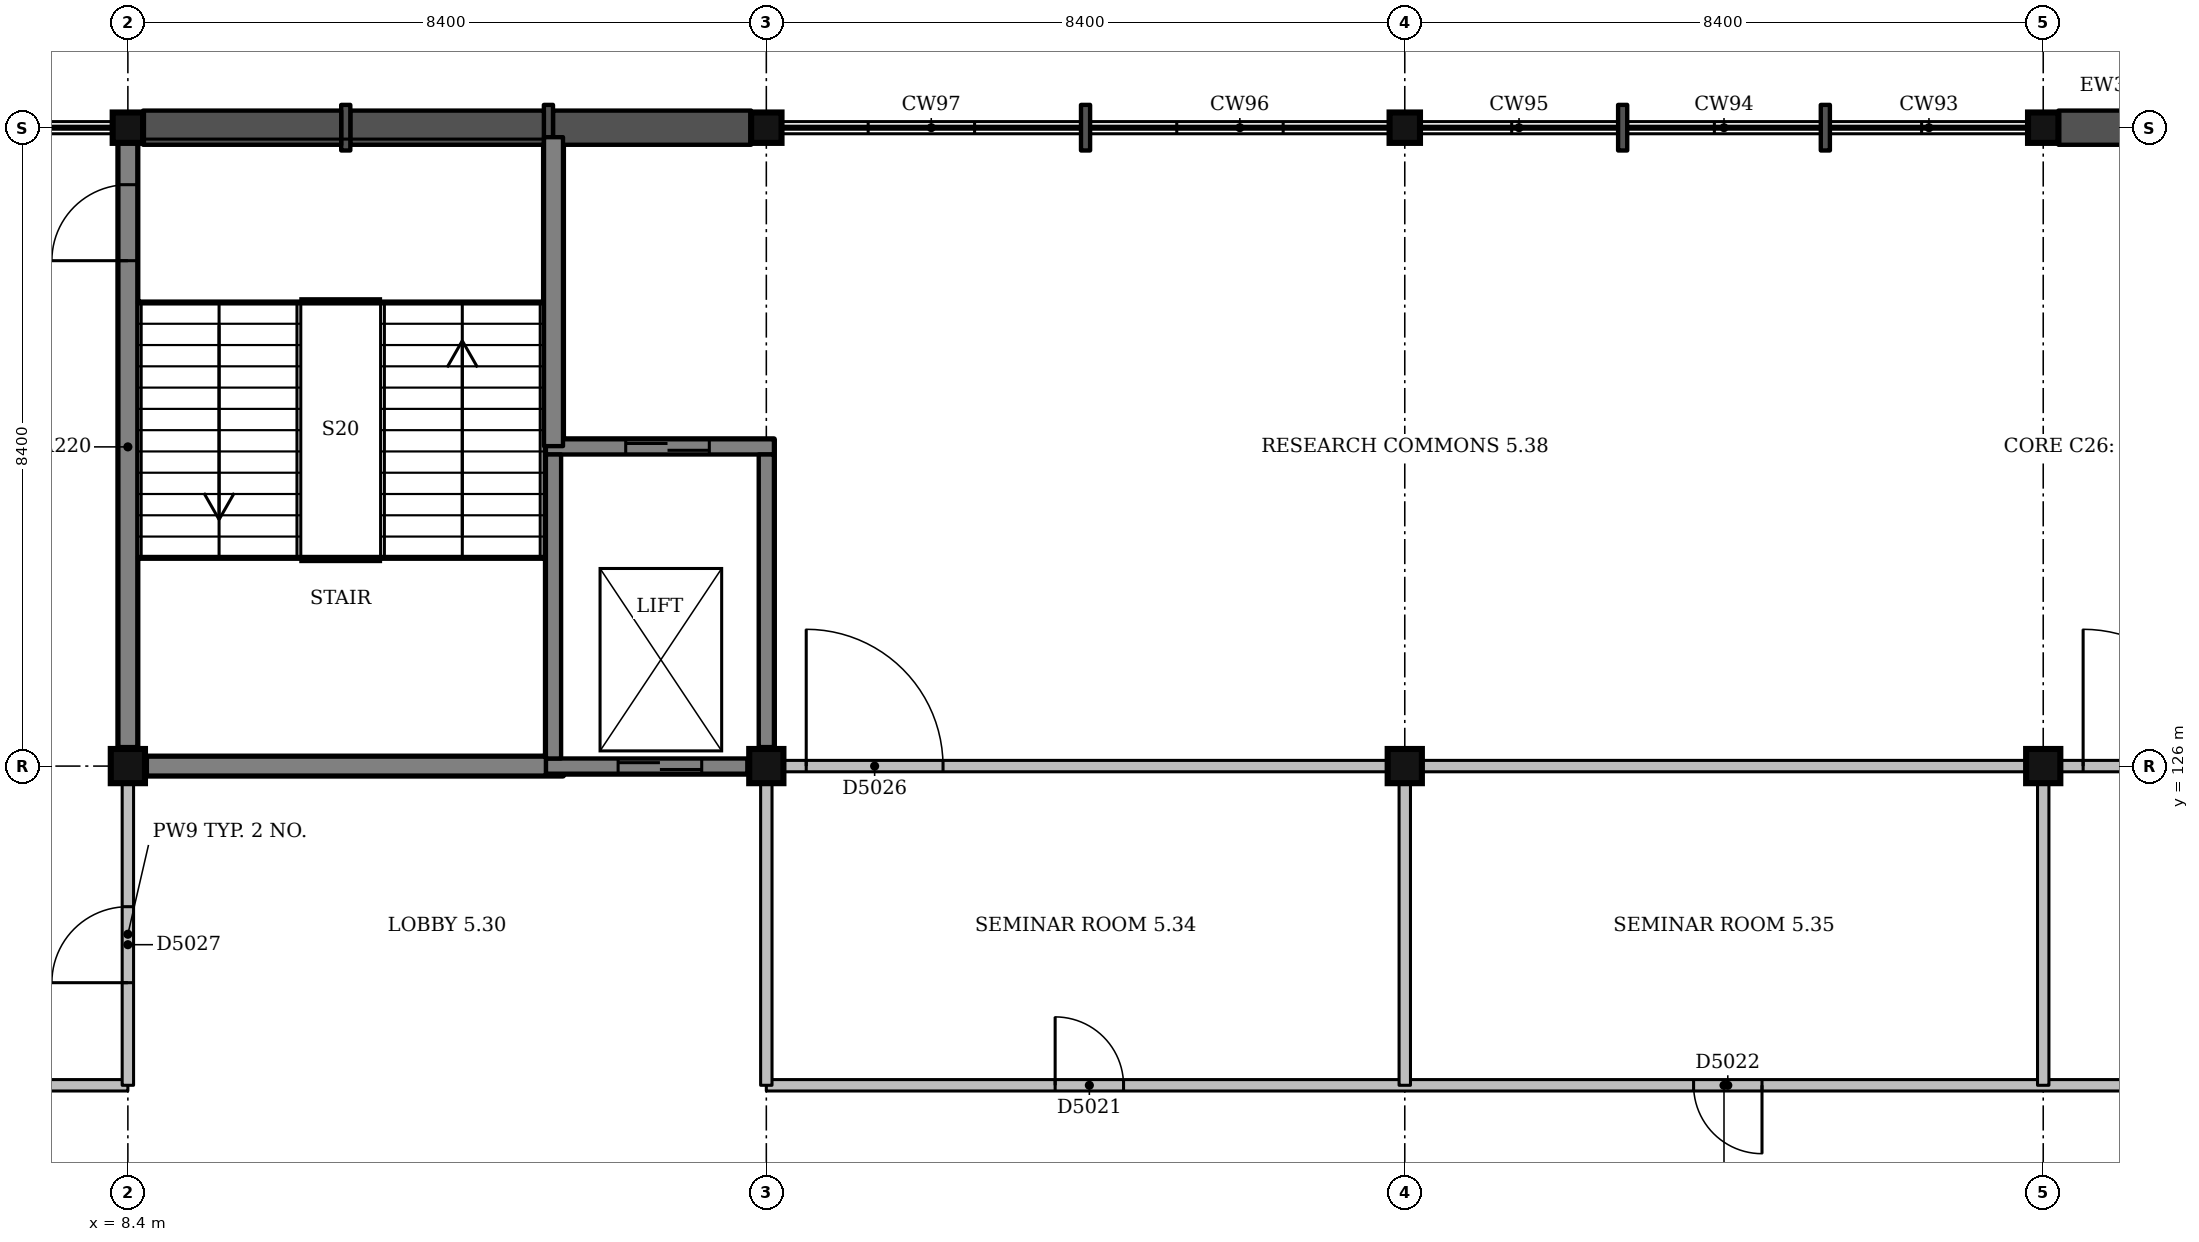
"""IFC4 building model, lengths in metres.
Left out: names, types, materials, properties, quantities, classifications, styles, units other than length and angle.
Written with IfcOpenShell. Run it as: python <this file> out.ifc"""

import sys

from ifc_helpers import new_model, si_unit, direction, frame, frame_2d, origin, origin_2d, place, context, subcontext, project, spatial, rectangle, extrude, element, fill, save


model = new_model("IFC4")
c1 = context("Model", 3, precision=1e-05, world=origin(), true_north=direction((0.0, 1.0)))
c2 = subcontext(c1, "Body", "Model", "MODEL_VIEW")
j1 = project(units=[si_unit("LENGTHUNIT", "METRE"), si_unit("PLANEANGLEUNIT", "RADIAN")], contexts=[c1])
p1 = place(None, origin())
s1 = spatial("IfcSite", under=j1, at=p1, CompositionType="ELEMENT")
p2 = place(p1, origin())
s2 = spatial("IfcBuilding", under=s1, at=p2, CompositionType="ELEMENT")
p3 = place(p2, frame((0.0, 0.0, 22.5)))
s3 = spatial("IfcBuildingStorey", under=s2, at=p3, CompositionType="ELEMENT", Elevation=22.5)
p4 = place(p3, frame((8.4, 126.0, 0.0), z_axis=(0.0, 0.0, 1.0), x_axis=(1.0, 0.0, 0.0)))
e1 = element("IfcColumn", 1, at=p4, inside=s3, PredefinedType="COLUMN", context=c2, shape_type="SweptSolid", body=[
    extrude(rectangle(XDim=0.45, YDim=0.45, at=origin_2d()), origin(), (0.0, 0.0, 1.0), 4.5),
])
p5 = place(p3, frame((8.4, 134.4, 0.0), z_axis=(0.0, 0.0, 1.0), x_axis=(1.0, 0.0, 0.0)))
e2 = element("IfcColumn", 2, at=p5, inside=s3, PredefinedType="COLUMN", context=c2, shape_type="SweptSolid", body=[
    extrude(rectangle(XDim=0.4, YDim=0.4, at=origin_2d()), origin(), (0.0, 0.0, 1.0), 4.5),
])
p6 = place(p3, frame((16.8, 126.0, 0.0), z_axis=(0.0, 0.0, 1.0), x_axis=(1.0, 0.0, 0.0)))
e3 = element("IfcColumn", 3, at=p6, inside=s3, PredefinedType="COLUMN", context=c2, shape_type="SweptSolid", body=[
    extrude(rectangle(XDim=0.45, YDim=0.45, at=origin_2d()), origin(), (0.0, 0.0, 1.0), 4.5),
])
p7 = place(p3, frame((16.8, 134.4, 0.0), z_axis=(0.0, 0.0, 1.0), x_axis=(1.0, 0.0, 0.0)))
e4 = element("IfcColumn", 4, at=p7, inside=s3, PredefinedType="COLUMN", context=c2, shape_type="SweptSolid", body=[
    extrude(rectangle(XDim=0.4, YDim=0.4, at=origin_2d()), origin(), (0.0, 0.0, 1.0), 4.5),
])
p8 = place(p3, frame((25.2, 126.0, 0.0), z_axis=(0.0, 0.0, 1.0), x_axis=(1.0, 0.0, 0.0)))
e5 = element("IfcColumn", 5, at=p8, inside=s3, PredefinedType="COLUMN", context=c2, shape_type="SweptSolid", body=[
    extrude(rectangle(XDim=0.45, YDim=0.45, at=origin_2d()), origin(), (0.0, 0.0, 1.0), 4.5),
])
p9 = place(p3, frame((25.2, 134.4, 0.0), z_axis=(0.0, 0.0, 1.0), x_axis=(1.0, 0.0, 0.0)))
e6 = element("IfcColumn", 6, at=p9, inside=s3, PredefinedType="COLUMN", context=c2, shape_type="SweptSolid", body=[
    extrude(rectangle(XDim=0.4, YDim=0.4, at=origin_2d()), origin(), (0.0, 0.0, 1.0), 4.5),
])
p10 = place(p3, frame((33.6, 126.0, 0.0), z_axis=(0.0, 0.0, 1.0), x_axis=(1.0, 0.0, 0.0)))
e7 = element("IfcColumn", 7, at=p10, inside=s3, PredefinedType="COLUMN", context=c2, shape_type="SweptSolid", body=[
    extrude(rectangle(XDim=0.45, YDim=0.45, at=origin_2d()), origin(), (0.0, 0.0, 1.0), 4.5),
])
p11 = place(p3, frame((33.6, 134.4, 0.0), z_axis=(0.0, 0.0, 1.0), x_axis=(1.0, 0.0, 0.0)))
e8 = element("IfcColumn", 8, at=p11, inside=s3, PredefinedType="COLUMN", context=c2, shape_type="SweptSolid", body=[
    extrude(rectangle(XDim=0.4, YDim=0.4, at=origin_2d()), origin(), (0.0, 0.0, 1.0), 4.5),
])
p12 = place(p3, frame((13.9, 126.0, 0.0), z_axis=(0.0, 0.0, 1.0), x_axis=(1.0, 0.0, 0.0)))
e9 = element("IfcWall", 9, at=p12, inside=s3, PredefinedType="SHEAR", context=c2, shape_type="SweptSolid", body=[
    extrude(rectangle(XDim=2.65, YDim=0.2, at=frame_2d((1.325, 0.0))), origin(), (0.0, 0.0, 1.0), 4.5),
])
p13 = place(p12, frame((0.95, 0.0, 0.0)))
e10 = element("IfcOpeningElement", 10, at=p13, cuts=e9, PredefinedType="OPENING", context=c2, shape_type="SweptSolid", body=[
    extrude(rectangle(XDim=1.1, YDim=2.1, at=frame_2d((0.55, 1.05))), frame((0.0, 0.11, 0.0), z_axis=(0.0, -1.0, 0.0), x_axis=(1.0, 0.0, 0.0)), (0.0, 0.0, 1.0), 0.22),
])
p14 = place(p3, frame((13.9, 130.2, 0.0), z_axis=(0.0, 0.0, 1.0), x_axis=(1.0, 0.0, 0.0)))
e11 = element("IfcWall", 11, at=p14, inside=s3, PredefinedType="SHEAR", context=c2, shape_type="SweptSolid", body=[
    extrude(rectangle(XDim=3.0, YDim=0.2, at=frame_2d((1.5, 0.0))), origin(), (0.0, 0.0, 1.0), 4.5),
])
p15 = place(p14, frame((1.05, 0.0, 0.0)))
e12 = element("IfcOpeningElement", 12, at=p15, cuts=e11, PredefinedType="OPENING", context=c2, shape_type="SweptSolid", body=[
    extrude(rectangle(XDim=1.1, YDim=2.1, at=frame_2d((0.55, 1.05))), frame((0.0, 0.11, 0.0), z_axis=(0.0, -1.0, 0.0), x_axis=(1.0, 0.0, 0.0)), (0.0, 0.0, 1.0), 0.22),
])
p16 = place(p3, frame((14.0, 126.1, 0.0), z_axis=(0.0, 0.0, 1.0), x_axis=(0.0, 1.0, 0.0)))
e13 = element("IfcWall", 13, at=p16, inside=s3, PredefinedType="SHEAR", context=c2, shape_type="SweptSolid", body=[
    extrude(rectangle(XDim=4.0, YDim=0.2, at=frame_2d((2.0, 0.0))), origin(), (0.0, 0.0, 1.0), 4.5),
])
p17 = place(p3, frame((16.8, 126.25, 0.0), z_axis=(0.0, 0.0, 1.0), x_axis=(0.0, 1.0, 0.0)))
e14 = element("IfcWall", 14, at=p17, inside=s3, PredefinedType="SHEAR", context=c2, shape_type="SweptSolid", body=[
    extrude(rectangle(XDim=3.85, YDim=0.2, at=frame_2d((1.925, 0.0))), origin(), (0.0, 0.0, 1.0), 4.5),
])
p18 = place(p3, frame((8.65, 126.0, 0.0), z_axis=(0.0, 0.0, 1.0), x_axis=(1.0, 0.0, 0.0)))
e15 = element("IfcWall", 15, at=p18, inside=s3, PredefinedType="SHEAR", context=c2, shape_type="SweptSolid", body=[
    extrude(rectangle(XDim=5.25, YDim=0.25, at=frame_2d((2.625, 0.0))), origin(), (0.0, 0.0, 1.0), 4.5),
])
p19 = place(p3, frame((8.4, 126.25, 0.0), z_axis=(0.0, 0.0, 1.0), x_axis=(0.0, 1.0, 0.0)))
e16 = element("IfcWall", 16, at=p19, inside=s3, PredefinedType="SHEAR", context=c2, shape_type="SweptSolid", body=[
    extrude(rectangle(XDim=7.95, YDim=0.25, at=frame_2d((3.975, 0.0))), origin(), (0.0, 0.0, 1.0), 4.5),
])
p20 = place(p19, frame((6.4, 0.0, 0.0)))
e17 = element("IfcOpeningElement", 17, at=p20, cuts=e16, PredefinedType="OPENING", context=c2, shape_type="SweptSolid", body=[
    extrude(rectangle(XDim=1.0, YDim=2.1, at=frame_2d((0.5, 1.05))), frame((0.0, 0.135, 0.0), z_axis=(0.0, -1.0, 0.0), x_axis=(1.0, 0.0, 0.0)), (0.0, 0.0, 1.0), 0.27),
])
p21 = place(p3, frame((14.0, 130.21, 0.0), z_axis=(0.0, 0.0, 1.0), x_axis=(0.0, 1.0, 0.0)))
e18 = element("IfcWall", 18, at=p21, inside=s3, PredefinedType="SHEAR", context=c2, shape_type="SweptSolid", body=[
    extrude(rectangle(XDim=4.065, YDim=0.25, at=frame_2d((2.032, 0.0))), origin(), (0.0, 0.0, 1.0), 4.5),
])
p22 = place(p3, frame((36.407, 134.4, 0.0), z_axis=(0.0, 0.0, 1.0), x_axis=(-1.0, 0.0, 0.0)))
e19 = element("IfcWall", 19, at=p22, inside=s3, PredefinedType="SOLIDWALL", context=c2, shape_type="SweptSolid", body=[
    extrude(rectangle(XDim=2.607, YDim=0.45, at=frame_2d((1.303, 0.0))), origin(), (0.0, 0.0, 1.0), 3.35),
])
p23 = place(p3, frame((30.793, 134.4, 0.0), z_axis=(0.0, 0.0, 1.0), x_axis=(-1.0, 0.0, 0.0)))
e20 = element("IfcWall", 20, at=p23, inside=s3, PredefinedType="SOLIDWALL", context=c2, shape_type="SweptSolid", body=[
    extrude(rectangle(XDim=0.12, YDim=0.6, at=frame_2d((0.06, 0.0))), origin(), (0.0, 0.0, 1.0), 3.35),
])
for number, where, z_axis, x_axis in (
    (21, (28.127, 134.4, 0.0), (0.0, 0.0, 1.0), (-1.0, 0.0, 0.0)),
    (22, (21.06, 134.4, 0.0), (0.0, 0.0, 1.0), (-1.0, 0.0, 0.0)),
):
    element("IfcWall", number, at=place(p3, frame(where, z_axis=z_axis, x_axis=x_axis)), inside=s3, PredefinedType="SOLIDWALL", context=c2, shape_type="SweptSolid", body=[
        extrude(rectangle(XDim=0.12, YDim=0.6, at=frame_2d((0.06, 0.0))), origin(), (0.0, 0.0, 1.0), 3.35),
    ])
p24 = place(p3, frame((16.6, 134.4, 0.0), z_axis=(0.0, 0.0, 1.0), x_axis=(-1.0, 0.0, 0.0)))
e23 = element("IfcWall", 23, at=p24, inside=s3, PredefinedType="SOLIDWALL", context=c2, shape_type="SweptSolid", body=[
    extrude(rectangle(XDim=2.607, YDim=0.45, at=frame_2d((1.303, 0.0))), origin(), (0.0, 0.0, 1.0), 3.35),
])
p25 = place(p3, frame((13.993, 134.4, 0.0), z_axis=(0.0, 0.0, 1.0), x_axis=(-1.0, 0.0, 0.0)))
e24 = element("IfcWall", 24, at=p25, inside=s3, PredefinedType="SOLIDWALL", context=c2, shape_type="SweptSolid", body=[
    extrude(rectangle(XDim=0.12, YDim=0.6, at=frame_2d((0.06, 0.0))), origin(), (0.0, 0.0, 1.0), 3.35),
])
p26 = place(p3, frame((13.873, 134.4, 0.0), z_axis=(0.0, 0.0, 1.0), x_axis=(-1.0, 0.0, 0.0)))
e25 = element("IfcWall", 25, at=p26, inside=s3, PredefinedType="SOLIDWALL", context=c2, shape_type="SweptSolid", body=[
    extrude(rectangle(XDim=2.547, YDim=0.45, at=frame_2d((1.273, 0.0))), origin(), (0.0, 0.0, 1.0), 3.35),
])
p27 = place(p3, frame((11.327, 134.4, 0.0), z_axis=(0.0, 0.0, 1.0), x_axis=(-1.0, 0.0, 0.0)))
e26 = element("IfcWall", 26, at=p27, inside=s3, PredefinedType="SOLIDWALL", context=c2, shape_type="SweptSolid", body=[
    extrude(rectangle(XDim=0.12, YDim=0.6, at=frame_2d((0.06, 0.0))), origin(), (0.0, 0.0, 1.0), 3.35),
])
p28 = place(p3, frame((11.207, 134.4, 0.0), z_axis=(0.0, 0.0, 1.0), x_axis=(-1.0, 0.0, 0.0)))
e27 = element("IfcWall", 27, at=p28, inside=s3, PredefinedType="SOLIDWALL", context=c2, shape_type="SweptSolid", body=[
    extrude(rectangle(XDim=2.607, YDim=0.45, at=frame_2d((1.303, 0.0))), origin(), (0.0, 0.0, 1.0), 3.35),
])
p29 = place(p3, frame((0.275, 121.8, 0.0), z_axis=(0.0, 0.0, 1.0), x_axis=(1.0, 0.0, 0.0)))
e28 = element("IfcWall", 28, at=p29, inside=s3, PredefinedType="PARTITIONING", context=c2, shape_type="SweptSolid", body=[
    extrude(rectangle(XDim=8.125, YDim=0.15, at=frame_2d((4.062, 0.0))), origin(), (0.0, 0.0, 1.0), 3.4),
])
p30 = place(p3, frame((16.8, 121.8, 0.0), z_axis=(0.0, 0.0, 1.0), x_axis=(1.0, 0.0, 0.0)))
e29 = element("IfcWall", 29, at=p30, inside=s3, PredefinedType="PARTITIONING", context=c2, shape_type="SweptSolid", body=[
    extrude(rectangle(XDim=25.2, YDim=0.15, at=frame_2d((12.6, 0.0))), origin(), (0.0, 0.0, 1.0), 3.4),
])
p31 = place(p30, frame((3.8, 0.0, 0.0)))
e30 = element("IfcOpeningElement", 30, at=p31, cuts=e29, PredefinedType="OPENING", context=c2, shape_type="SweptSolid", body=[
    extrude(rectangle(XDim=0.9, YDim=2.1, at=frame_2d((0.45, 1.05))), frame((0.0, 0.085, 0.0), z_axis=(0.0, -1.0, 0.0), x_axis=(1.0, 0.0, 0.0)), (0.0, 0.0, 1.0), 0.17),
])
p32 = place(p30, frame((12.2, 0.0, 0.0)))
e31 = element("IfcOpeningElement", 31, at=p32, cuts=e29, PredefinedType="OPENING", context=c2, shape_type="SweptSolid", body=[
    extrude(rectangle(XDim=0.9, YDim=2.1, at=frame_2d((0.45, 1.05))), frame((0.0, 0.085, 0.0), z_axis=(0.0, -1.0, 0.0), x_axis=(1.0, 0.0, 0.0)), (0.0, 0.0, 1.0), 0.17),
])
p33 = place(p30, frame((20.6, 0.0, 0.0)))
e32 = element("IfcOpeningElement", 32, at=p33, cuts=e29, PredefinedType="OPENING", context=c2, shape_type="SweptSolid", body=[
    extrude(rectangle(XDim=0.9, YDim=2.1, at=frame_2d((0.45, 1.05))), frame((0.0, 0.085, 0.0), z_axis=(0.0, -1.0, 0.0), x_axis=(1.0, 0.0, 0.0)), (0.0, 0.0, 1.0), 0.17),
])
p34 = place(p3, frame((17.025, 126.0, 0.0), z_axis=(0.0, 0.0, 1.0), x_axis=(1.0, 0.0, 0.0)))
e33 = element("IfcWall", 33, at=p34, inside=s3, PredefinedType="PARTITIONING", context=c2, shape_type="SweptSolid", body=[
    extrude(rectangle(XDim=7.95, YDim=0.15, at=frame_2d((3.975, 0.0))), origin(), (0.0, 0.0, 1.0), 3.4),
])
p35 = place(p34, frame((0.3, 0.0, 0.0)))
e34 = element("IfcOpeningElement", 34, at=p35, cuts=e33, PredefinedType="OPENING", context=c2, shape_type="SweptSolid", body=[
    extrude(rectangle(XDim=1.8, YDim=2.1, at=frame_2d((0.9, 1.05))), frame((0.0, 0.085, 0.0), z_axis=(0.0, -1.0, 0.0), x_axis=(1.0, 0.0, 0.0)), (0.0, 0.0, 1.0), 0.17),
])
p36 = place(p3, frame((25.425, 126.0, 0.0), z_axis=(0.0, 0.0, 1.0), x_axis=(1.0, 0.0, 0.0)))
e35 = element("IfcWall", 35, at=p36, inside=s3, PredefinedType="PARTITIONING", context=c2, shape_type="SweptSolid", body=[
    extrude(rectangle(XDim=7.95, YDim=0.15, at=frame_2d((3.975, 0.0))), origin(), (0.0, 0.0, 1.0), 3.4),
])
p37 = place(p3, frame((33.825, 126.0, 0.0), z_axis=(0.0, 0.0, 1.0), x_axis=(1.0, 0.0, 0.0)))
e36 = element("IfcWall", 36, at=p37, inside=s3, PredefinedType="PARTITIONING", context=c2, shape_type="SweptSolid", body=[
    extrude(rectangle(XDim=2.425, YDim=0.15, at=frame_2d((1.212, 0.0))), origin(), (0.0, 0.0, 1.0), 3.4),
])
p38 = place(p37, frame((0.3, 0.0, 0.0)))
e37 = element("IfcOpeningElement", 37, at=p38, cuts=e36, PredefinedType="OPENING", context=c2, shape_type="SweptSolid", body=[
    extrude(rectangle(XDim=1.8, YDim=2.1, at=frame_2d((0.9, 1.05))), frame((0.0, 0.085, 0.0), z_axis=(0.0, -1.0, 0.0), x_axis=(1.0, 0.0, 0.0)), (0.0, 0.0, 1.0), 0.17),
])
p39 = place(p3, frame((8.4, 121.8, 0.0), z_axis=(0.0, 0.0, 1.0), x_axis=(0.0, 1.0, 0.0)))
e38 = element("IfcWall", 38, at=p39, inside=s3, PredefinedType="PARTITIONING", context=c2, shape_type="SweptSolid", body=[
    extrude(rectangle(XDim=3.975, YDim=0.15, at=frame_2d((1.987, 0.0))), origin(), (0.0, 0.0, 1.0), 3.4),
])
p40 = place(p39, frame((1.35, 0.0, 0.0)))
e39 = element("IfcOpeningElement", 39, at=p40, cuts=e38, PredefinedType="OPENING", context=c2, shape_type="SweptSolid", body=[
    extrude(rectangle(XDim=1.0, YDim=2.1, at=frame_2d((0.5, 1.05))), frame((0.0, 0.085, 0.0), z_axis=(0.0, -1.0, 0.0), x_axis=(1.0, 0.0, 0.0)), (0.0, 0.0, 1.0), 0.17),
])
for number, where, z_axis, x_axis in (
    (40, (16.8, 121.8, 0.0), (0.0, 0.0, 1.0), (0.0, 1.0, 0.0)),
    (41, (25.2, 121.8, 0.0), (0.0, 0.0, 1.0), (0.0, 1.0, 0.0)),
    (42, (33.6, 121.8, 0.0), (0.0, 0.0, 1.0), (0.0, 1.0, 0.0)),
):
    element("IfcWall", number, at=place(p3, frame(where, z_axis=z_axis, x_axis=x_axis)), inside=s3, PredefinedType="PARTITIONING", context=c2, shape_type="SweptSolid", body=[
        extrude(rectangle(XDim=3.975, YDim=0.15, at=frame_2d((1.987, 0.0))), origin(), (0.0, 0.0, 1.0), 3.4),
    ])
p41 = place(p31, origin())
e43 = element("IfcDoor", 43, at=p41, inside=s3, OperationType="SINGLE_SWING_LEFT", PredefinedType="DOOR", context=c2, shape_type="SweptSolid", body=[
    extrude(rectangle(XDim=0.9, YDim=2.1, at=frame_2d((0.45, 1.05))), frame((0.0, 0.025, 0.0), z_axis=(0.0, -1.0, 0.0), x_axis=(1.0, 0.0, 0.0)), (0.0, 0.0, 1.0), 0.05),
])
fill(e30, e43)
p42 = place(p32, origin())
e44 = element("IfcDoor", 44, at=p42, inside=s3, OperationType="SINGLE_SWING_RIGHT", PredefinedType="DOOR", context=c2, shape_type="SweptSolid", body=[
    extrude(rectangle(XDim=0.9, YDim=2.1, at=frame_2d((0.45, 1.05))), frame((0.0, 0.025, 0.0), z_axis=(0.0, -1.0, 0.0), x_axis=(1.0, 0.0, 0.0)), (0.0, 0.0, 1.0), 0.05),
])
fill(e31, e44)
p43 = place(p38, origin())
e45 = element("IfcDoor", 45, at=p43, inside=s3, OperationType="DOUBLE_DOOR_SINGLE_SWING", PredefinedType="DOOR", context=c2, shape_type="SweptSolid", body=[
    extrude(rectangle(XDim=1.8, YDim=2.1, at=frame_2d((0.9, 1.05))), frame((0.0, 0.025, 0.0), z_axis=(0.0, -1.0, 0.0), x_axis=(1.0, 0.0, 0.0)), (0.0, 0.0, 1.0), 0.05),
])
fill(e37, e45)
p44 = place(p35, origin())
e46 = element("IfcDoor", 46, at=p44, inside=s3, OperationType="DOUBLE_DOOR_SINGLE_SWING", PredefinedType="DOOR", context=c2, shape_type="SweptSolid", body=[
    extrude(rectangle(XDim=1.8, YDim=2.1, at=frame_2d((0.9, 1.05))), frame((0.0, 0.025, 0.0), z_axis=(0.0, -1.0, 0.0), x_axis=(1.0, 0.0, 0.0)), (0.0, 0.0, 1.0), 0.05),
])
fill(e34, e46)
p45 = place(p40, origin())
e47 = element("IfcDoor", 47, at=p45, inside=s3, OperationType="SINGLE_SWING_LEFT", PredefinedType="DOOR", context=c2, shape_type="SweptSolid", body=[
    extrude(rectangle(XDim=1.0, YDim=2.1, at=frame_2d((0.5, 1.05))), frame((0.0, 0.025, 0.0), z_axis=(0.0, -1.0, 0.0), x_axis=(1.0, 0.0, 0.0)), (0.0, 0.0, 1.0), 0.05),
])
fill(e39, e47)
p46 = place(p20, origin())
e48 = element("IfcDoor", 48, at=p46, inside=s3, OperationType="SINGLE_SWING_LEFT", PredefinedType="DOOR", context=c2, shape_type="SweptSolid", body=[
    extrude(rectangle(XDim=1.0, YDim=2.1, at=frame_2d((0.5, 1.05))), frame((0.0, 0.025, 0.0), z_axis=(0.0, -1.0, 0.0), x_axis=(1.0, 0.0, 0.0)), (0.0, 0.0, 1.0), 0.05),
])
fill(e17, e48)
p47 = place(p13, origin())
e49 = element("IfcDoor", 49, at=p47, inside=s3, OperationType="SLIDING_TO_RIGHT", PredefinedType="DOOR", context=c2, shape_type="SweptSolid", body=[
    extrude(rectangle(XDim=1.1, YDim=2.1, at=frame_2d((0.55, 1.05))), frame((0.0, 0.025, 0.0), z_axis=(0.0, -1.0, 0.0), x_axis=(1.0, 0.0, 0.0)), (0.0, 0.0, 1.0), 0.05),
])
fill(e10, e49)
p48 = place(p15, origin())
e50 = element("IfcDoor", 50, at=p48, inside=s3, OperationType="SLIDING_TO_LEFT", PredefinedType="DOOR", context=c2, shape_type="SweptSolid", body=[
    extrude(rectangle(XDim=1.1, YDim=2.1, at=frame_2d((0.55, 1.05))), frame((0.0, 0.025, 0.0), z_axis=(0.0, -1.0, 0.0), x_axis=(1.0, 0.0, 0.0)), (0.0, 0.0, 1.0), 0.05),
])
fill(e12, e50)
save(model, sys.argv[1])
